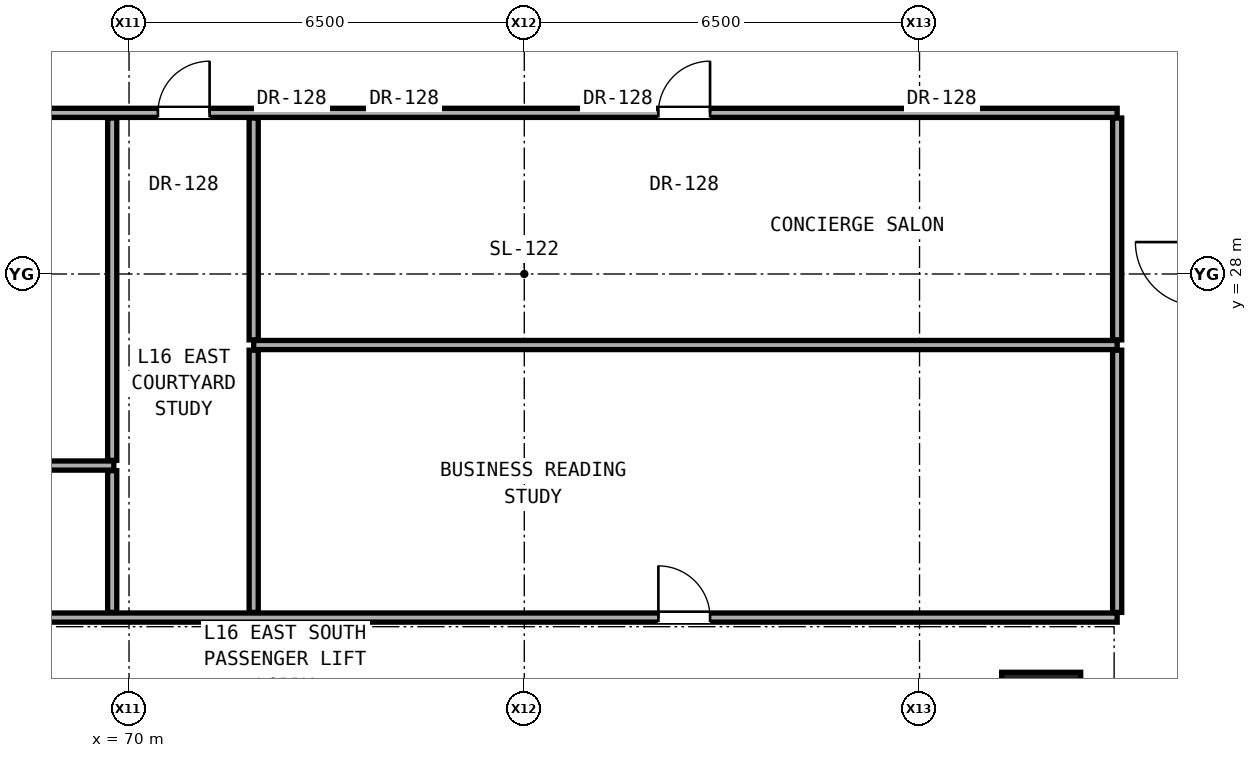
"""IFC4 building model, lengths in metres.
Left out: names, types, materials, properties, quantities, classifications, styles, units other than length and angle.
Written with IfcOpenShell. Run it as: python <this file> out.ifc"""

import sys

from ifc_helpers import new_model, si_unit, direction, frame, frame_2d, origin, origin_2d, place, context, subcontext, project, spatial, rectangle, extrude, element, fill, save


model = new_model("IFC4")
c1 = context("Model", 3, precision=1e-05, world=origin(), true_north=direction((0.0, 1.0)))
c2 = subcontext(c1, "Body", "Model", "MODEL_VIEW")
j1 = project(units=[si_unit("LENGTHUNIT", "METRE"), si_unit("PLANEANGLEUNIT", "RADIAN")], contexts=[c1])
p1 = place(None, origin())
s1 = spatial("IfcSite", under=j1, at=p1, CompositionType="ELEMENT")
p2 = place(p1, origin())
s2 = spatial("IfcBuilding", under=s1, at=p2, CompositionType="ELEMENT")
p3 = place(p2, frame((0.0, 0.0, 58.7)))
s3 = spatial("IfcBuildingStorey", under=s2, at=p3, CompositionType="ELEMENT", Elevation=58.7)
p4 = place(p3, frame((85.0, 20.8, 0.0), z_axis=(0.0, 0.0, 1.0), x_axis=(1.0, 0.0, 0.0)))
e1 = element("IfcColumn", 1, at=p4, inside=s3, PredefinedType="COLUMN", context=c2, shape_type="SweptSolid", body=[
    extrude(rectangle(XDim=1.3, YDim=1.3, at=origin_2d()), origin(), (0.0, 0.0, 1.0), 3.3),
])
p5 = place(p3, frame((66.62, 22.35, 0.0), z_axis=(0.0, 0.0, 1.0), x_axis=(1.0, 0.0, 0.0)))
e2 = element("IfcWall", 2, at=p5, inside=s3, PredefinedType="PARTITIONING", context=c2, shape_type="SweptSolid", body=[
    extrude(rectangle(XDim=19.63, YDim=0.15, at=frame_2d((9.815, 0.0))), origin(), (0.0, 0.0, 1.0), 2.125),
])
p6 = place(p5, frame((12.085, 0.0, 0.0)))
e3 = element("IfcOpeningElement", 3, at=p6, cuts=e2, PredefinedType="OPENING", context=c2, shape_type="SweptSolid", body=[
    extrude(rectangle(XDim=0.85, YDim=2.01, at=frame_2d((0.425, 1.005))), frame((0.0, 0.085, 0.0), z_axis=(0.0, -1.0, 0.0), x_axis=(1.0, 0.0, 0.0)), (0.0, 0.0, 1.0), 0.17),
])
p7 = place(p3, frame((66.62, 24.85, 0.0), z_axis=(0.0, 0.0, 1.0), x_axis=(1.0, 0.0, 0.0)))
e4 = element("IfcWall", 4, at=p7, inside=s3, PredefinedType="PARTITIONING", context=c2, shape_type="SweptSolid", body=[
    extrude(rectangle(XDim=3.13, YDim=0.15, at=frame_2d((1.565, 0.0))), origin(), (0.0, 0.0, 1.0), 2.125),
])
p8 = place(p3, frame((72.05, 26.832, 0.0), z_axis=(0.0, 0.0, 1.0), x_axis=(1.0, 0.0, 0.0)))
e5 = element("IfcWall", 5, at=p8, inside=s3, PredefinedType="PARTITIONING", context=c2, shape_type="SweptSolid", body=[
    extrude(rectangle(XDim=14.2, YDim=0.15, at=frame_2d((7.1, 0.0))), origin(), (0.0, 0.0, 1.0), 2.125),
])
p9 = place(p3, frame((66.62, 30.65, 0.0), z_axis=(0.0, 0.0, 1.0), x_axis=(1.0, 0.0, 0.0)))
e6 = element("IfcWall", 6, at=p9, inside=s3, PredefinedType="PARTITIONING", context=c2, shape_type="SweptSolid", body=[
    extrude(rectangle(XDim=19.63, YDim=0.15, at=frame_2d((9.815, 0.0))), origin(), (0.0, 0.0, 1.0), 2.125),
])
p10 = place(p9, frame((3.855, 0.0, 0.0)))
e7 = element("IfcOpeningElement", 7, at=p10, cuts=e6, PredefinedType="OPENING", context=c2, shape_type="SweptSolid", body=[
    extrude(rectangle(XDim=0.85, YDim=2.01, at=frame_2d((0.425, 1.005))), frame((0.0, 0.085, 0.0), z_axis=(0.0, -1.0, 0.0), x_axis=(1.0, 0.0, 0.0)), (0.0, 0.0, 1.0), 0.17),
])
p11 = place(p9, frame((12.085, 0.0, 0.0)))
e8 = element("IfcOpeningElement", 8, at=p11, cuts=e6, PredefinedType="OPENING", context=c2, shape_type="SweptSolid", body=[
    extrude(rectangle(XDim=0.85, YDim=2.01, at=frame_2d((0.425, 1.005))), frame((0.0, 0.085, 0.0), z_axis=(0.0, -1.0, 0.0), x_axis=(1.0, 0.0, 0.0)), (0.0, 0.0, 1.0), 0.17),
])
p12 = place(p3, frame((69.723, 22.435, 0.0), z_axis=(0.0, 0.0, 1.0), x_axis=(0.0, 1.0, 0.0)))
e9 = element("IfcWall", 9, at=p12, inside=s3, PredefinedType="PARTITIONING", context=c2, shape_type="SweptSolid", body=[
    extrude(rectangle(XDim=2.33, YDim=0.15, at=frame_2d((1.165, 0.0))), origin(), (0.0, 0.0, 1.0), 3.06),
])
p13 = place(p3, frame((69.723, 24.935, 0.0), z_axis=(0.0, 0.0, 1.0), x_axis=(0.0, 1.0, 0.0)))
e10 = element("IfcWall", 10, at=p13, inside=s3, PredefinedType="PARTITIONING", context=c2, shape_type="SweptSolid", body=[
    extrude(rectangle(XDim=5.63, YDim=0.15, at=frame_2d((2.815, 0.0))), origin(), (0.0, 0.0, 1.0), 2.125),
])
p14 = place(p3, frame((72.05, 22.435, 0.0), z_axis=(0.0, 0.0, 1.0), x_axis=(0.0, 1.0, 0.0)))
e11 = element("IfcWall", 11, at=p14, inside=s3, PredefinedType="PARTITIONING", context=c2, shape_type="SweptSolid", body=[
    extrude(rectangle(XDim=4.312, YDim=0.15, at=frame_2d((2.156, 0.0))), origin(), (0.0, 0.0, 1.0), 2.589),
])
p15 = place(p3, frame((72.05, 26.917, 0.0), z_axis=(0.0, 0.0, 1.0), x_axis=(0.0, 1.0, 0.0)))
e12 = element("IfcWall", 12, at=p15, inside=s3, PredefinedType="PARTITIONING", context=c2, shape_type="SweptSolid", body=[
    extrude(rectangle(XDim=3.648, YDim=0.15, at=frame_2d((1.824, 0.0))), origin(), (0.0, 0.0, 1.0), 2.125),
])
p16 = place(p3, frame((86.25, 22.435, 0.0), z_axis=(0.0, 0.0, 1.0), x_axis=(0.0, 1.0, 0.0)))
e13 = element("IfcWall", 13, at=p16, inside=s3, PredefinedType="PARTITIONING", context=c2, shape_type="SweptSolid", body=[
    extrude(rectangle(XDim=4.312, YDim=0.15, at=frame_2d((2.156, 0.0))), origin(), (0.0, 0.0, 1.0), 3.06),
])
p17 = place(p3, frame((86.25, 26.917, 0.0), z_axis=(0.0, 0.0, 1.0), x_axis=(0.0, 1.0, 0.0)))
e14 = element("IfcWall", 14, at=p17, inside=s3, PredefinedType="PARTITIONING", context=c2, shape_type="SweptSolid", body=[
    extrude(rectangle(XDim=3.648, YDim=0.15, at=frame_2d((1.824, 0.0))), origin(), (0.0, 0.0, 1.0), 2.279),
])
p18 = place(p10, origin())
e15 = element("IfcDoor", 15, at=p18, inside=s3, OperationType="SINGLE_SWING_RIGHT", PredefinedType="DOOR", context=c2, shape_type="SweptSolid", body=[
    extrude(rectangle(XDim=0.85, YDim=2.01, at=frame_2d((0.425, 1.005))), frame((0.0, 0.025, 0.0), z_axis=(0.0, -1.0, 0.0), x_axis=(1.0, 0.0, 0.0)), (0.0, 0.0, 1.0), 0.05),
])
fill(e7, e15)
p19 = place(p6, origin())
e16 = element("IfcDoor", 16, at=p19, inside=s3, OperationType="SINGLE_SWING_LEFT", PredefinedType="DOOR", context=c2, shape_type="SweptSolid", body=[
    extrude(rectangle(XDim=0.85, YDim=2.01, at=frame_2d((0.425, 1.005))), frame((0.0, 0.025, 0.0), z_axis=(0.0, -1.0, 0.0), x_axis=(1.0, 0.0, 0.0)), (0.0, 0.0, 1.0), 0.05),
])
fill(e3, e16)
p20 = place(p11, origin())
e17 = element("IfcDoor", 17, at=p20, inside=s3, OperationType="SINGLE_SWING_RIGHT", PredefinedType="DOOR", context=c2, shape_type="SweptSolid", body=[
    extrude(rectangle(XDim=0.85, YDim=2.01, at=frame_2d((0.425, 1.005))), frame((0.0, 0.025, 0.0), z_axis=(0.0, -1.0, 0.0), x_axis=(1.0, 0.0, 0.0)), (0.0, 0.0, 1.0), 0.05),
])
fill(e8, e17)
save(model, sys.argv[1])
